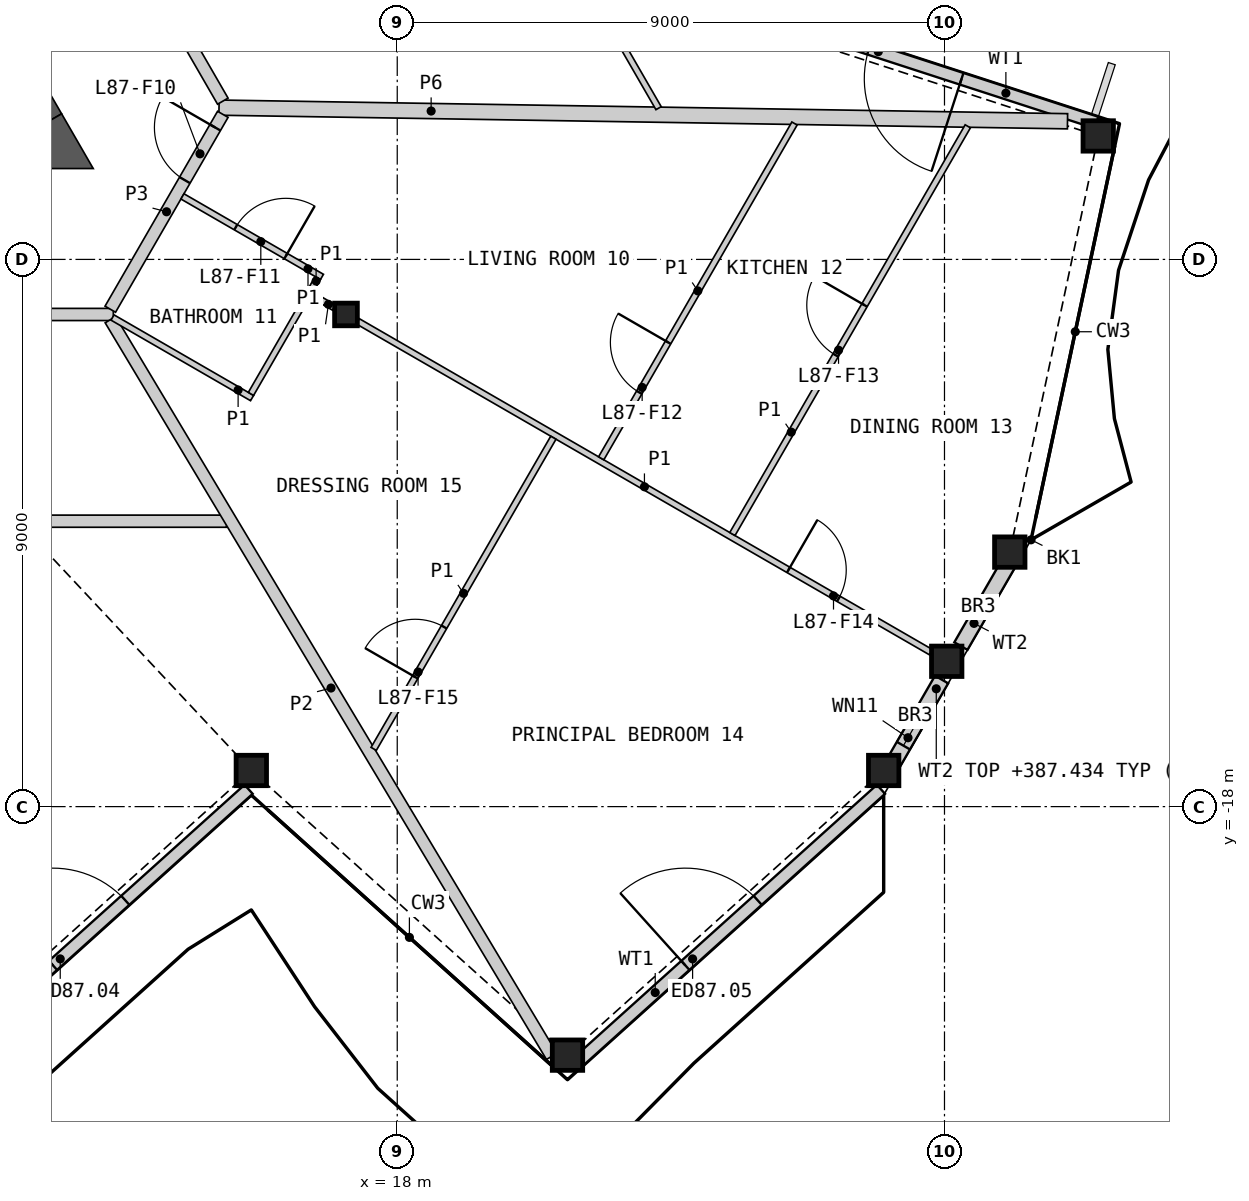
"""IFC4 building model, lengths in metres.
Left out: names, types, materials, properties, quantities, classifications, styles, units other than length and angle.
Written with IfcOpenShell. Run it as: python <this file> out.ifc"""

import sys

from ifc_helpers import new_model, si_unit, direction, frame, frame_2d, origin, origin_2d, place, context, subcontext, project, spatial, polyline, rectangle, hollow_rectangle, i_section, outline, extrude, element, fill, save


model = new_model("IFC4")
c1 = context("Model", 3, precision=1e-05, world=origin(), true_north=direction((0.0, 1.0)))
c2 = subcontext(c1, "Body", "Model", "MODEL_VIEW")
j1 = project(units=[si_unit("LENGTHUNIT", "METRE"), si_unit("PLANEANGLEUNIT", "RADIAN")], contexts=[c1])
p1 = place(None, origin())
s1 = spatial("IfcSite", under=j1, at=p1, CompositionType="ELEMENT")
p2 = place(p1, origin())
s2 = spatial("IfcBuilding", under=s1, at=p2, CompositionType="ELEMENT")
p3 = place(p2, frame((0.0, 0.0, 384.8)))
s3 = spatial("IfcBuildingStorey", under=s2, at=p3, CompositionType="ELEMENT", Elevation=384.8)
for number, where, z_axis, x_axis in (
    (1, (15.6, -17.406, 0.0), (0.0, 0.0, 1.0), (1.0, 0.0, 0.0)),
    (2, (20.8, -22.088, 0.0), (0.0, 0.0, 1.0), (1.0, 0.0, 0.0)),
    (3, (26.0, -17.406, 0.0), (0.0, 0.0, 1.0), (1.0, 0.0, 0.0)),
    (4, (27.037, -15.61, 0.0), (0.0, 0.0, 1.0), (1.0, 0.0, 0.0)),
    (5, (28.074, -13.814, 0.0), (0.0, 0.0, 1.0), (1.0, 0.0, 0.0)),
    (6, (29.529, -6.969, 0.0), (0.0, 0.0, 1.0), (1.0, 0.0, 0.0)),
):
    element("IfcColumn", number, at=place(p3, frame(where, z_axis=z_axis, x_axis=x_axis)), inside=s3, PredefinedType="COLUMN", context=c2, shape_type="SweptSolid", body=[
        extrude(hollow_rectangle(XDim=0.5, YDim=0.5, WallThickness=0.03, at=origin_2d()), origin(), (0.0, 0.0, 1.0), 3.4),
    ])
p4 = place(p3, frame((17.157, -9.906, 0.0), z_axis=(0.0, 0.0, 1.0), x_axis=(1.0, 0.0, 0.0)))
e7 = element("IfcColumn", 7, at=p4, inside=s3, PredefinedType="COLUMN", context=c2, shape_type="SweptSolid", body=[
    extrude(i_section(OverallWidth=0.374, OverallDepth=0.372, WebThickness=0.016, FlangeThickness=0.026, at=origin_2d()), origin(), (0.0, 0.0, 1.0), 3.4),
])
p5 = place(p3, frame((10.605, -22.173, 0.0), z_axis=(0.0, 0.0, 1.0), x_axis=(0.743135582201, 0.669140871915, 0.0)))
e8 = element("IfcWall", 8, at=p5, inside=s3, PredefinedType="SOLIDWALL", context=c2, shape_type="SweptSolid", body=[
    extrude(rectangle(XDim=6.662, YDim=0.2, at=frame_2d((3.331, 0.0))), origin(), (0.0, 0.0, 1.0), 2.634),
])
p6 = place(p5, frame((2.333, 0.0, 0.0)))
e9 = element("IfcOpeningElement", 9, at=p6, cuts=e8, PredefinedType="OPENING", context=c2, shape_type="SweptSolid", body=[
    extrude(rectangle(XDim=1.6, YDim=2.25, at=frame_2d((0.8, 1.125))), frame((0.0, 0.11, 0.0), z_axis=(0.0, -1.0, 0.0), x_axis=(1.0, 0.0, 0.0)), (0.0, 0.0, 1.0), 0.22),
])
p7 = place(p3, frame((21.005, -22.173, 0.0), z_axis=(0.0, 0.0, 1.0), x_axis=(0.743135582201, 0.669140871915, 0.0)))
e10 = element("IfcWall", 10, at=p7, inside=s3, PredefinedType="SOLIDWALL", context=c2, shape_type="SweptSolid", body=[
    extrude(rectangle(XDim=6.662, YDim=0.2, at=frame_2d((3.331, 0.0))), origin(), (0.0, 0.0, 1.0), 2.634),
])
p8 = place(p7, frame((2.333, 0.0, 0.0)))
e11 = element("IfcOpeningElement", 11, at=p8, cuts=e10, PredefinedType="OPENING", context=c2, shape_type="SweptSolid", body=[
    extrude(rectangle(XDim=1.6, YDim=2.25, at=frame_2d((0.8, 1.125))), frame((0.0, 0.11, 0.0), z_axis=(0.0, -1.0, 0.0), x_axis=(1.0, 0.0, 0.0)), (0.0, 0.0, 1.0), 0.22),
])
p9 = place(p3, frame((26.075, -17.43, 0.0), z_axis=(0.0, 0.0, 1.0), x_axis=(0.500027377864, 0.86600959659, 0.0)))
e12 = element("IfcWall", 12, at=p9, inside=s3, PredefinedType="SOLIDWALL", context=c2, shape_type="SweptSolid", body=[
    extrude(rectangle(XDim=1.756, YDim=0.25, at=frame_2d((0.878, 0.0))), origin(), (0.0, 0.0, 1.0), 2.634),
])
p10 = place(p9, frame((0.5, 0.0, 1.7)))
e13 = element("IfcOpeningElement", 13, at=p10, cuts=e12, PredefinedType="OPENING", context=c2, shape_type="SweptSolid", body=[
    extrude(rectangle(XDim=0.6, YDim=0.7, at=frame_2d((0.3, 0.35))), frame((0.0, 0.135, 0.0), z_axis=(0.0, -1.0, 0.0), x_axis=(1.0, 0.0, 0.0)), (0.0, 0.0, 1.0), 0.27),
])
p11 = place(p3, frame((27.27, -15.36, 0.0), z_axis=(0.0, 0.0, 1.0), x_axis=(0.499975693202, 0.866039436866, 0.0)))
e14 = element("IfcWall", 14, at=p11, inside=s3, PredefinedType="SOLIDWALL", context=c2, shape_type="SweptSolid", body=[
    extrude(rectangle(XDim=1.725, YDim=0.25, at=frame_2d((0.862, 0.0))), origin(), (0.0, 0.0, 1.0), 2.634),
])
p12 = place(p3, frame((29.5, -6.75, 0.0), z_axis=(0.0, 0.0, 1.0), x_axis=(-0.951060123915, 0.309005891041, 0.0)))
e15 = element("IfcWall", 15, at=p12, inside=s3, PredefinedType="SOLIDWALL", context=c2, shape_type="SweptSolid", body=[
    extrude(rectangle(XDim=6.265, YDim=0.2, at=frame_2d((3.133, 0.0))), origin(), (0.0, 0.0, 1.0), 2.634),
])
p13 = place(p12, frame((2.333, 0.0, 0.0)))
e16 = element("IfcOpeningElement", 16, at=p13, cuts=e15, PredefinedType="OPENING", context=c2, shape_type="SweptSolid", body=[
    extrude(rectangle(XDim=1.6, YDim=2.25, at=frame_2d((0.8, 1.125))), frame((0.0, 0.11, 0.0), z_axis=(0.0, -1.0, 0.0), x_axis=(1.0, 0.0, 0.0)), (0.0, 0.0, 1.0), 0.22),
])
p14 = place(p3, frame((12.221, -6.756, 0.0), z_axis=(0.0, 0.0, 1.0), x_axis=(-0.500020646047, 0.866013483456, 0.0)))
e17 = element("IfcWall", 17, at=p14, inside=s3, PredefinedType="SHEAR", context=c2, shape_type="SweptSolid", body=[
    extrude(rectangle(XDim=4.559, YDim=0.6, at=frame_2d((2.28, 0.0))), origin(), (0.0, 0.0, 1.0), 3.1),
])
p15 = place(p3, origin())
e18 = element("IfcWall", 18, at=p15, inside=s3, PredefinedType="SHEAR", context=c2, shape_type="SweptSolid", body=[
    extrude(outline(polyline([(11.961, -7.506), (11.961, -6.906), (12.48, -6.606), (13.0, -7.506), (11.961, -7.506)])), origin(), (0.0, 0.0, 1.0), 3.1),
])
p16 = place(p3, frame((15.069, -6.503, 0.0), z_axis=(0.0, 0.0, 1.0), x_axis=(0.999870484296, -0.016093931549, 0.0)))
e19 = element("IfcWall", 19, at=p16, inside=s3, PredefinedType="PARTITIONING", context=c2, shape_type="SweptSolid", body=[
    extrude(rectangle(XDim=13.956, YDim=0.25, at=frame_2d((6.978, 0.0))), origin(), (0.0, 0.0, 1.0), 2.33),
])
p17 = place(p3, frame((8.775, -9.906, 0.0), z_axis=(0.0, 0.0, 1.0), x_axis=(1.0, 0.0, 0.0)))
e20 = element("IfcWall", 20, at=p17, inside=s3, PredefinedType="PARTITIONING", context=c2, shape_type="SweptSolid", body=[
    extrude(rectangle(XDim=4.555, YDim=0.2, at=frame_2d((2.278, 0.0))), origin(), (0.0, 0.0, 1.0), 3.1),
])
p18 = place(p3, frame((12.981, -2.673, 0.0), z_axis=(0.0, 0.0, 1.0), x_axis=(0.499986217557, -0.866033360935, 0.0)))
e21 = element("IfcWall", 21, at=p18, inside=s3, PredefinedType="PARTITIONING", context=c2, shape_type="SweptSolid", body=[
    extrude(rectangle(XDim=4.3, YDim=0.2, at=frame_2d((2.15, 0.0))), origin(), (0.0, 0.0, 1.0), 3.1),
])
p19 = place(p3, frame((13.281, -9.819, 0.0), z_axis=(0.0, 0.0, 1.0), x_axis=(0.499948957823, 0.866054870994, 0.0)))
e22 = element("IfcWall", 22, at=p19, inside=s3, PredefinedType="PARTITIONING", context=c2, shape_type="SweptSolid", body=[
    extrude(rectangle(XDim=3.701, YDim=0.2, at=frame_2d((1.851, 0.0))), origin(), (0.0, 0.0, 1.0), 3.1),
])
p20 = place(p19, frame((2.451, 0.0, 0.0)))
e23 = element("IfcOpeningElement", 23, at=p20, cuts=e22, PredefinedType="OPENING", context=c2, shape_type="SweptSolid", body=[
    extrude(rectangle(XDim=1.0, YDim=2.1, at=frame_2d((0.5, 1.05))), frame((0.0, 0.11, 0.0), z_axis=(0.0, -1.0, 0.0), x_axis=(1.0, 0.0, 0.0)), (0.0, 0.0, 1.0), 0.22),
])
p21 = place(p3, frame((0.1, -13.306, 0.0), z_axis=(0.0, 0.0, 1.0), x_axis=(1.0, 0.0, 0.0)))
e24 = element("IfcWall", 24, at=p21, inside=s3, PredefinedType="PARTITIONING", context=c2, shape_type="SweptSolid", body=[
    extrude(rectangle(XDim=15.094, YDim=0.2, at=frame_2d((7.547, 0.0))), origin(), (0.0, 0.0, 1.0), 2.33),
])
p22 = place(p21, frame((9.781, 0.0, 0.0)))
e25 = element("IfcOpeningElement", 25, at=p22, cuts=e24, PredefinedType="OPENING", context=c2, shape_type="SweptSolid", body=[
    extrude(rectangle(XDim=0.95, YDim=2.1, at=frame_2d((0.475, 1.05))), frame((0.0, 0.11, 0.0), z_axis=(0.0, -1.0, 0.0), x_axis=(1.0, 0.0, 0.0)), (0.0, 0.0, 1.0), 0.22),
])
p23 = place(p3, frame((13.282, -9.991, 0.0), z_axis=(0.0, 0.0, 1.0), x_axis=(0.513867741763, -0.857869421285, 0.0)))
e26 = element("IfcWall", 26, at=p23, inside=s3, PredefinedType="PARTITIONING", context=c2, shape_type="SweptSolid", body=[
    extrude(rectangle(XDim=14.124, YDim=0.2, at=frame_2d((7.062, 0.0))), origin(), (0.0, 0.0, 1.0), 2.33),
])
p24 = place(p3, frame((17.354, -10.019, 0.0), z_axis=(0.0, 0.0, 1.0), x_axis=(0.866019680922, -0.500009912158, 0.0)))
e27 = element("IfcWall", 27, at=p24, inside=s3, PredefinedType="PARTITIONING", context=c2, shape_type="SweptSolid", body=[
    extrude(rectangle(XDim=10.881, YDim=0.1, at=frame_2d((5.44, 0.0))), origin(), (0.0, 0.0, 1.0), 2.33),
])
p25 = place(p24, frame((8.176, 0.0, 0.0)))
e28 = element("IfcOpeningElement", 28, at=p25, cuts=e27, PredefinedType="OPENING", context=c2, shape_type="SweptSolid", body=[
    extrude(rectangle(XDim=0.95, YDim=2.1, at=frame_2d((0.475, 1.05))), frame((0.0, 0.06, 0.0), z_axis=(0.0, -1.0, 0.0), x_axis=(1.0, 0.0, 0.0)), (0.0, 0.0, 1.0), 0.12),
])
p26 = place(p3, frame((23.512, -13.517, 0.0), z_axis=(0.0, 0.0, 1.0), x_axis=(0.49998445949, 0.866034375916, 0.0)))
e29 = element("IfcWall", 29, at=p26, inside=s3, PredefinedType="PARTITIONING", context=c2, shape_type="SweptSolid", body=[
    extrude(rectangle(XDim=7.743, YDim=0.1, at=frame_2d((3.872, 0.0))), origin(), (0.0, 0.0, 1.0), 2.33),
])
p27 = place(p26, frame((3.397, 0.0, 0.0)))
e30 = element("IfcOpeningElement", 30, at=p27, cuts=e29, PredefinedType="OPENING", context=c2, shape_type="SweptSolid", body=[
    extrude(rectangle(XDim=0.95, YDim=2.1, at=frame_2d((0.475, 1.05))), frame((0.0, 0.06, 0.0), z_axis=(0.0, -1.0, 0.0), x_axis=(1.0, 0.0, 0.0)), (0.0, 0.0, 1.0), 0.12),
])
p28 = place(p3, frame((21.354, -12.271, 0.0), z_axis=(0.0, 0.0, 1.0), x_axis=(0.499983931063, 0.866034680991, 0.0)))
e31 = element("IfcWall", 31, at=p28, inside=s3, PredefinedType="PARTITIONING", context=c2, shape_type="SweptSolid", body=[
    extrude(rectangle(XDim=6.358, YDim=0.1, at=frame_2d((3.179, 0.0))), origin(), (0.0, 0.0, 1.0), 2.33),
])
p29 = place(p28, frame((1.252, 0.0, 0.0)))
e32 = element("IfcOpeningElement", 32, at=p29, cuts=e31, PredefinedType="OPENING", context=c2, shape_type="SweptSolid", body=[
    extrude(rectangle(XDim=0.95, YDim=2.1, at=frame_2d((0.475, 1.05))), frame((0.0, 0.06, 0.0), z_axis=(0.0, -1.0, 0.0), x_axis=(1.0, 0.0, 0.0)), (0.0, 0.0, 1.0), 0.12),
])
p30 = place(p3, frame((19.128, -1.023, 0.0), z_axis=(0.0, 0.0, 1.0), x_axis=(0.499991387631, -0.866030376081, 0.0)))
e33 = element("IfcWall", 33, at=p30, inside=s3, PredefinedType="PARTITIONING", context=c2, shape_type="SweptSolid", body=[
    extrude(rectangle(XDim=6.339, YDim=0.1, at=frame_2d((3.169, 0.0))), origin(), (0.0, 0.0, 1.0), 2.33),
])
p31 = place(p30, frame((2.389, 0.0, 0.0)))
e34 = element("IfcOpeningElement", 34, at=p31, cuts=e33, PredefinedType="OPENING", context=c2, shape_type="SweptSolid", body=[
    extrude(rectangle(XDim=0.95, YDim=2.1, at=frame_2d((0.475, 1.05))), frame((0.0, 0.06, 0.0), z_axis=(0.0, -1.0, 0.0), x_axis=(1.0, 0.0, 0.0)), (0.0, 0.0, 1.0), 0.12),
])
p32 = place(p3, frame((17.613, -17.051, 0.0), z_axis=(0.0, 0.0, 1.0), x_axis=(0.499982307286, 0.866035618437, 0.0)))
e35 = element("IfcWall", 35, at=p32, inside=s3, PredefinedType="PARTITIONING", context=c2, shape_type="SweptSolid", body=[
    extrude(rectangle(XDim=5.91, YDim=0.1, at=frame_2d((2.955, 0.0))), origin(), (0.0, 0.0, 1.0), 2.33),
])
p33 = place(p32, frame((1.365, 0.0, 0.0)))
e36 = element("IfcOpeningElement", 36, at=p33, cuts=e35, PredefinedType="OPENING", context=c2, shape_type="SweptSolid", body=[
    extrude(rectangle(XDim=0.95, YDim=2.1, at=frame_2d((0.475, 1.05))), frame((0.0, 0.06, 0.0), z_axis=(0.0, -1.0, 0.0), x_axis=(1.0, 0.0, 0.0)), (0.0, 0.0, 1.0), 0.12),
])
p34 = place(p3, frame((13.317, -9.956, 0.0), z_axis=(0.0, 0.0, 1.0), x_axis=(0.866052124492, -0.499953715521, 0.0)))
e37 = element("IfcWall", 37, at=p34, inside=s3, PredefinedType="PARTITIONING", context=c2, shape_type="SweptSolid", body=[
    extrude(rectangle(XDim=2.65, YDim=0.1, at=frame_2d((1.325, 0.0))), origin(), (0.0, 0.0, 1.0), 2.33),
])
p35 = place(p3, frame((14.468, -7.964, 0.0), z_axis=(0.0, 0.0, 1.0), x_axis=(0.86603978909, -0.499975083092, 0.0)))
e38 = element("IfcWall", 38, at=p35, inside=s3, PredefinedType="PARTITIONING", context=c2, shape_type="SweptSolid", body=[
    extrude(rectangle(XDim=2.649, YDim=0.1, at=frame_2d((1.325, 0.0))), origin(), (0.0, 0.0, 1.0), 2.33),
])
p36 = place(p35, frame((1.013, 0.0, 0.0)))
e39 = element("IfcOpeningElement", 39, at=p36, cuts=e38, PredefinedType="OPENING", context=c2, shape_type="SweptSolid", body=[
    extrude(rectangle(XDim=0.95, YDim=2.1, at=frame_2d((0.475, 1.05))), frame((0.0, 0.06, 0.0), z_axis=(0.0, -1.0, 0.0), x_axis=(1.0, 0.0, 0.0)), (0.0, 0.0, 1.0), 0.12),
])
p37 = place(p3, frame((15.594, -11.212, 0.0), z_axis=(0.0, 0.0, 1.0), x_axis=(0.500011643316, 0.866018681408, 0.0)))
e40 = element("IfcWall", 40, at=p37, inside=s3, PredefinedType="PARTITIONING", context=c2, shape_type="SweptSolid", body=[
    extrude(rectangle(XDim=1.973, YDim=0.1, at=frame_2d((0.987, 0.0))), origin(), (0.0, 0.0, 1.0), 2.33),
])
p38 = place(p3, frame((16.594, -9.581, 0.0), z_axis=(0.0, 0.0, 1.0), x_axis=(0.866137484628, -0.499805820016, 0.0)))
e41 = element("IfcWall", 41, at=p38, inside=s3, PredefinedType="PARTITIONING", context=c2, shape_type="SweptSolid", body=[
    extrude(rectangle(XDim=0.423, YDim=0.1, at=frame_2d((0.211, 0.0))), origin(), (0.0, 0.0, 1.0), 2.33),
])
p39 = place(p3, frame((16.582, -9.501, 0.0), z_axis=(0.0, 0.0, 1.0), x_axis=(0.498246276801, 0.867035551551, 0.0)))
e42 = element("IfcWall", 42, at=p39, inside=s3, PredefinedType="PARTITIONING", context=c2, shape_type="SweptSolid", body=[
    extrude(rectangle(XDim=0.224, YDim=0.1, at=frame_2d((0.112, 0.0))), origin(), (0.0, 0.0, 1.0), 2.33),
])
p40 = place(p6, origin())
e43 = element("IfcDoor", 43, at=p40, inside=s3, OperationType="DOUBLE_DOOR_SINGLE_SWING", PredefinedType="DOOR", context=c2, shape_type="SweptSolid", body=[
    extrude(rectangle(XDim=1.6, YDim=2.25, at=frame_2d((0.8, 1.125))), frame((0.0, 0.025, 0.0), z_axis=(0.0, -1.0, 0.0), x_axis=(1.0, 0.0, 0.0)), (0.0, 0.0, 1.0), 0.05),
])
fill(e9, e43)
p41 = place(p8, origin())
e44 = element("IfcDoor", 44, at=p41, inside=s3, OperationType="DOUBLE_DOOR_SINGLE_SWING", PredefinedType="DOOR", context=c2, shape_type="SweptSolid", body=[
    extrude(rectangle(XDim=1.6, YDim=2.25, at=frame_2d((0.8, 1.125))), frame((0.0, 0.025, 0.0), z_axis=(0.0, -1.0, 0.0), x_axis=(1.0, 0.0, 0.0)), (0.0, 0.0, 1.0), 0.05),
])
fill(e11, e44)
p42 = place(p10, origin())
e45 = element("IfcWindow", 45, at=p42, inside=s3, PartitioningType="SINGLE_PANEL", PredefinedType="WINDOW", context=c2, shape_type="SweptSolid", body=[
    extrude(rectangle(XDim=0.6, YDim=0.7, at=frame_2d((0.3, 0.35))), frame((0.0, 0.03, 0.0), z_axis=(0.0, -1.0, 0.0), x_axis=(1.0, 0.0, 0.0)), (0.0, 0.0, 1.0), 0.06),
])
fill(e13, e45)
p43 = place(p13, origin())
e46 = element("IfcDoor", 46, at=p43, inside=s3, OperationType="DOUBLE_DOOR_SINGLE_SWING", PredefinedType="DOOR", context=c2, shape_type="SweptSolid", body=[
    extrude(rectangle(XDim=1.6, YDim=2.25, at=frame_2d((0.8, 1.125))), frame((0.0, 0.025, 0.0), z_axis=(0.0, -1.0, 0.0), x_axis=(1.0, 0.0, 0.0)), (0.0, 0.0, 1.0), 0.05),
])
fill(e16, e46)
p44 = place(p20, origin())
e47 = element("IfcDoor", 47, at=p44, inside=s3, OperationType="SINGLE_SWING_RIGHT", PredefinedType="DOOR", context=c2, shape_type="SweptSolid", body=[
    extrude(rectangle(XDim=1.0, YDim=2.1, at=frame_2d((0.5, 1.05))), frame((0.0, 0.025, 0.0), z_axis=(0.0, -1.0, 0.0), x_axis=(1.0, 0.0, 0.0)), (0.0, 0.0, 1.0), 0.05),
])
fill(e23, e47)
p45 = place(p36, origin())
e48 = element("IfcDoor", 48, at=p45, inside=s3, OperationType="SINGLE_SWING_RIGHT", PredefinedType="DOOR", context=c2, shape_type="SweptSolid", body=[
    extrude(rectangle(XDim=0.95, YDim=2.1, at=frame_2d((0.475, 1.05))), frame((0.0, 0.025, 0.0), z_axis=(0.0, -1.0, 0.0), x_axis=(1.0, 0.0, 0.0)), (0.0, 0.0, 1.0), 0.05),
])
fill(e39, e48)
p46 = place(p29, origin())
e49 = element("IfcDoor", 49, at=p46, inside=s3, OperationType="SINGLE_SWING_RIGHT", PredefinedType="DOOR", context=c2, shape_type="SweptSolid", body=[
    extrude(rectangle(XDim=0.95, YDim=2.1, at=frame_2d((0.475, 1.05))), frame((0.0, 0.025, 0.0), z_axis=(0.0, -1.0, 0.0), x_axis=(1.0, 0.0, 0.0)), (0.0, 0.0, 1.0), 0.05),
])
fill(e32, e49)
p47 = place(p27, origin())
e50 = element("IfcDoor", 50, at=p47, inside=s3, OperationType="SINGLE_SWING_RIGHT", PredefinedType="DOOR", context=c2, shape_type="SweptSolid", body=[
    extrude(rectangle(XDim=0.95, YDim=2.1, at=frame_2d((0.475, 1.05))), frame((0.0, 0.025, 0.0), z_axis=(0.0, -1.0, 0.0), x_axis=(1.0, 0.0, 0.0)), (0.0, 0.0, 1.0), 0.05),
])
fill(e30, e50)
p48 = place(p25, origin())
e51 = element("IfcDoor", 51, at=p48, inside=s3, OperationType="SINGLE_SWING_LEFT", PredefinedType="DOOR", context=c2, shape_type="SweptSolid", body=[
    extrude(rectangle(XDim=0.95, YDim=2.1, at=frame_2d((0.475, 1.05))), frame((0.0, 0.025, 0.0), z_axis=(0.0, -1.0, 0.0), x_axis=(1.0, 0.0, 0.0)), (0.0, 0.0, 1.0), 0.05),
])
fill(e28, e51)
p49 = place(p33, origin())
e52 = element("IfcDoor", 52, at=p49, inside=s3, OperationType="SINGLE_SWING_LEFT", PredefinedType="DOOR", context=c2, shape_type="SweptSolid", body=[
    extrude(rectangle(XDim=0.95, YDim=2.1, at=frame_2d((0.475, 1.05))), frame((0.0, 0.025, 0.0), z_axis=(0.0, -1.0, 0.0), x_axis=(1.0, 0.0, 0.0)), (0.0, 0.0, 1.0), 0.05),
])
fill(e36, e52)
save(model, sys.argv[1])
